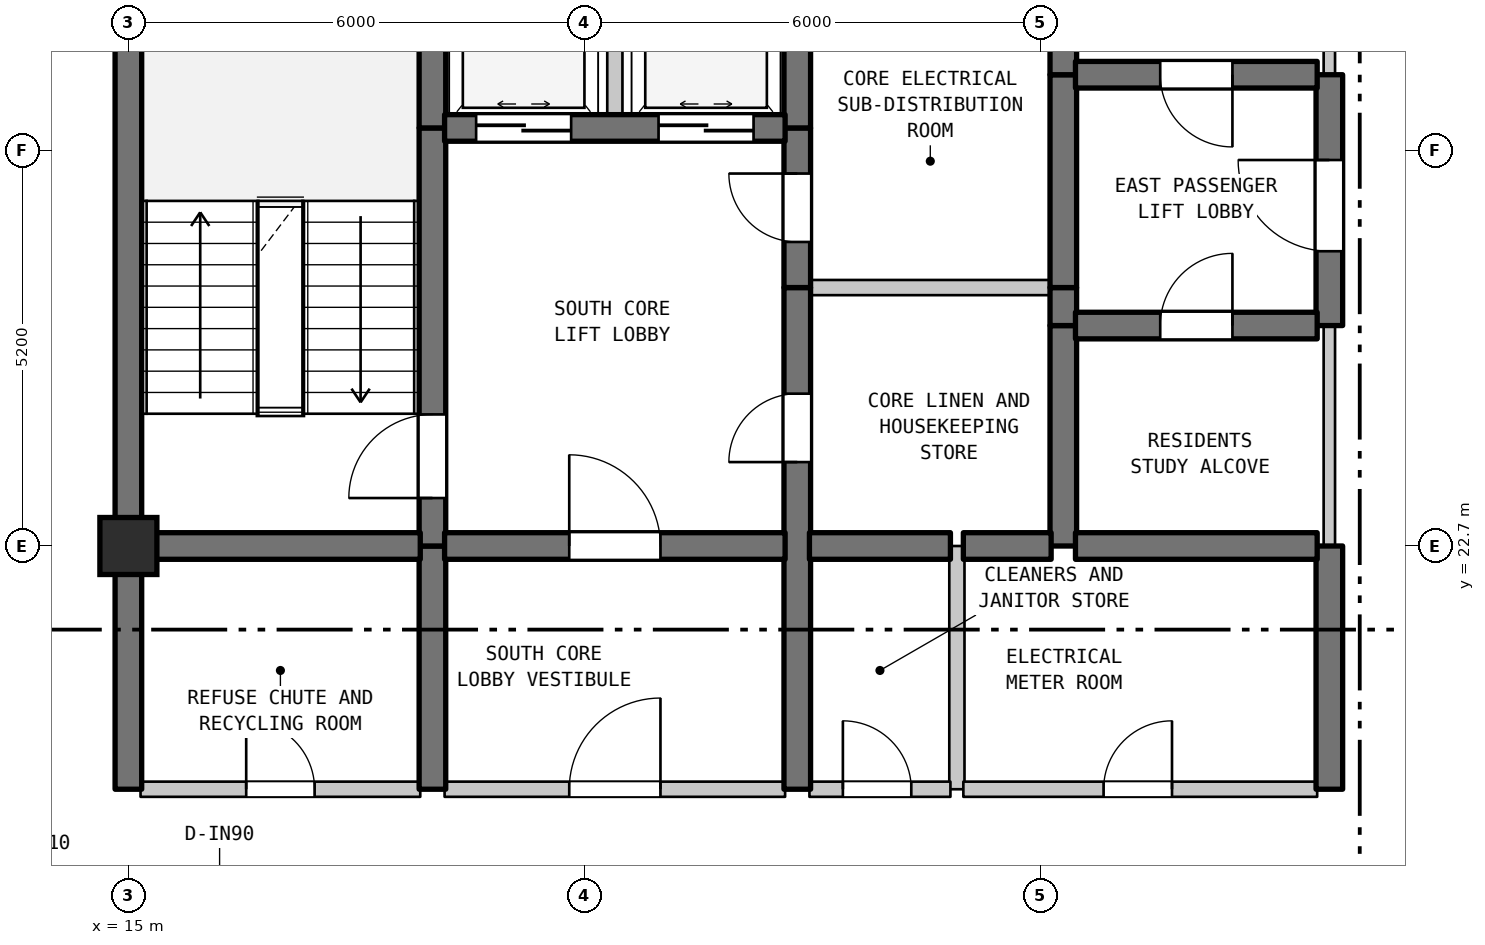
"""IFC4 building model, lengths in metres.
Left out: names, types, materials, properties, quantities, classifications, styles, units other than length and angle.
Written with IfcOpenShell. Run it as: python <this file> out.ifc"""

import sys

from ifc_helpers import new_model, si_unit, direction, frame, frame_2d, origin, origin_2d, place, context, subcontext, project, spatial, rectangle, extrude, element, fill, save


model = new_model("IFC4")
c1 = context("Model", 3, precision=1e-05, world=origin(), true_north=direction((0.0, 1.0)))
c2 = subcontext(c1, "Body", "Model", "MODEL_VIEW")
j1 = project(units=[si_unit("LENGTHUNIT", "METRE"), si_unit("PLANEANGLEUNIT", "RADIAN")], contexts=[c1])
p1 = place(None, origin())
s1 = spatial("IfcSite", under=j1, at=p1, CompositionType="ELEMENT")
p2 = place(p1, origin())
s2 = spatial("IfcBuilding", under=s1, at=p2, CompositionType="ELEMENT")
p3 = place(p2, frame((0.0, 0.0, 269.5)))
s3 = spatial("IfcBuildingStorey", under=s2, at=p3, CompositionType="ELEMENT", Elevation=269.5)
p4 = place(p3, frame((15.0, 22.7, 0.0), z_axis=(0.0, 0.0, 1.0), x_axis=(1.0, 0.0, 0.0)))
e1 = element("IfcColumn", 1, at=p4, inside=s3, PredefinedType="COLUMN", context=c2, shape_type="SweptSolid", body=[
    extrude(rectangle(XDim=0.75, YDim=0.75, at=origin_2d()), origin(), (0.0, 0.0, 1.0), 3.7),
])
p5 = place(p3, frame((15.0, 19.5, 0.0), z_axis=(0.0, 0.0, 1.0), x_axis=(0.0, 1.0, 0.0)))
e2 = element("IfcWall", 2, at=p5, inside=s3, PredefinedType="SHEAR", context=c2, shape_type="SweptSolid", body=[
    extrude(rectangle(XDim=3.2, YDim=0.35, at=frame_2d((1.6, 0.0))), origin(), (0.0, 0.0, 1.0), 3.39),
])
p6 = place(p3, frame((15.0, 22.7, 0.0), z_axis=(0.0, 0.0, 1.0), x_axis=(0.0, 1.0, 0.0)))
e3 = element("IfcWall", 3, at=p6, inside=s3, PredefinedType="SHEAR", context=c2, shape_type="SweptSolid", body=[
    extrude(rectangle(XDim=6.8, YDim=0.35, at=frame_2d((3.4, 0.0))), origin(), (0.0, 0.0, 1.0), 3.39),
])
p7 = place(p3, frame((19.0, 19.5, 0.0), z_axis=(0.0, 0.0, 1.0), x_axis=(0.0, 1.0, 0.0)))
e4 = element("IfcWall", 4, at=p7, inside=s3, PredefinedType="SHEAR", context=c2, shape_type="SweptSolid", body=[
    extrude(rectangle(XDim=3.2, YDim=0.35, at=frame_2d((1.6, 0.0))), origin(), (0.0, 0.0, 1.0), 3.39),
])
p8 = place(p3, frame((19.0, 22.7, 0.0), z_axis=(0.0, 0.0, 1.0), x_axis=(0.0, 1.0, 0.0)))
e5 = element("IfcWall", 5, at=p8, inside=s3, PredefinedType="SHEAR", context=c2, shape_type="SweptSolid", body=[
    extrude(rectangle(XDim=5.5, YDim=0.35, at=frame_2d((2.75, 0.0))), origin(), (0.0, 0.0, 1.0), 3.39),
])
p9 = place(p8, frame((0.631, 0.0, 0.0)))
e6 = element("IfcOpeningElement", 6, at=p9, cuts=e5, PredefinedType="OPENING", context=c2, shape_type="SweptSolid", body=[
    extrude(rectangle(XDim=1.1, YDim=2.15, at=frame_2d((0.55, 1.075))), frame((0.0, 0.185, 0.0), z_axis=(0.0, -1.0, 0.0), x_axis=(1.0, 0.0, 0.0)), (0.0, 0.0, 1.0), 0.37),
])
p10 = place(p3, frame((19.0, 28.2, 0.0), z_axis=(0.0, 0.0, 1.0), x_axis=(0.0, 1.0, 0.0)))
e7 = element("IfcWall", 7, at=p10, inside=s3, PredefinedType="SHEAR", context=c2, shape_type="SweptSolid", body=[
    extrude(rectangle(XDim=1.3, YDim=0.35, at=frame_2d((0.65, 0.0))), origin(), (0.0, 0.0, 1.0), 3.39),
])
p11 = place(p3, frame((21.4, 28.2, 0.0), z_axis=(0.0, 0.0, 1.0), x_axis=(0.0, 1.0, 0.0)))
e8 = element("IfcWall", 8, at=p11, inside=s3, PredefinedType="STANDARD", context=c2, shape_type="SweptSolid", body=[
    extrude(rectangle(XDim=2.6, YDim=0.2, at=frame_2d((1.3, 0.0))), origin(), (0.0, 0.0, 1.0), 3.39),
])
p12 = place(p3, frame((23.8, 19.5, 0.0), z_axis=(0.0, 0.0, 1.0), x_axis=(0.0, 1.0, 0.0)))
e9 = element("IfcWall", 9, at=p12, inside=s3, PredefinedType="SHEAR", context=c2, shape_type="SweptSolid", body=[
    extrude(rectangle(XDim=6.6, YDim=0.35, at=frame_2d((3.3, 0.0))), origin(), (0.0, 0.0, 1.0), 3.39),
])
p13 = place(p12, frame((4.304, 0.0, 0.0)))
e10 = element("IfcOpeningElement", 10, at=p13, cuts=e9, PredefinedType="OPENING", context=c2, shape_type="SweptSolid", body=[
    extrude(rectangle(XDim=0.9, YDim=2.15, at=frame_2d((0.45, 1.075))), frame((0.0, 0.185, 0.0), z_axis=(0.0, -1.0, 0.0), x_axis=(1.0, 0.0, 0.0)), (0.0, 0.0, 1.0), 0.37),
])
p14 = place(p3, frame((23.8, 26.1, 0.0), z_axis=(0.0, 0.0, 1.0), x_axis=(0.0, 1.0, 0.0)))
e11 = element("IfcWall", 11, at=p14, inside=s3, PredefinedType="SHEAR", context=c2, shape_type="SweptSolid", body=[
    extrude(rectangle(XDim=2.1, YDim=0.35, at=frame_2d((1.05, 0.0))), origin(), (0.0, 0.0, 1.0), 3.39),
])
p15 = place(p14, frame((0.6, 0.0, 0.0)))
e12 = element("IfcOpeningElement", 12, at=p15, cuts=e11, PredefinedType="OPENING", context=c2, shape_type="SweptSolid", body=[
    extrude(rectangle(XDim=0.9, YDim=2.15, at=frame_2d((0.45, 1.075))), frame((0.0, 0.185, 0.0), z_axis=(0.0, -1.0, 0.0), x_axis=(1.0, 0.0, 0.0)), (0.0, 0.0, 1.0), 0.37),
])
p16 = place(p3, frame((23.8, 28.2, 0.0), z_axis=(0.0, 0.0, 1.0), x_axis=(0.0, 1.0, 0.0)))
e13 = element("IfcWall", 13, at=p16, inside=s3, PredefinedType="SHEAR", context=c2, shape_type="SweptSolid", body=[
    extrude(rectangle(XDim=2.6, YDim=0.35, at=frame_2d((1.3, 0.0))), origin(), (0.0, 0.0, 1.0), 3.39),
])
p17 = place(p3, frame((25.9, 19.5, 0.0), z_axis=(0.0, 0.0, 1.0), x_axis=(0.0, 1.0, 0.0)))
e14 = element("IfcWall", 14, at=p17, inside=s3, PredefinedType="STANDARD", context=c2, shape_type="SweptSolid", body=[
    extrude(rectangle(XDim=3.2, YDim=0.2, at=frame_2d((1.6, 0.0))), origin(), (0.0, 0.0, 1.0), 3.39),
])
p18 = place(p3, frame((27.3, 22.7, 0.0), z_axis=(0.0, 0.0, 1.0), x_axis=(0.0, 1.0, 0.0)))
e15 = element("IfcWall", 15, at=p18, inside=s3, PredefinedType="SHEAR", context=c2, shape_type="SweptSolid", body=[
    extrude(rectangle(XDim=2.9, YDim=0.35, at=frame_2d((1.45, 0.0))), origin(), (0.0, 0.0, 1.0), 3.39),
])
p19 = place(p3, frame((27.3, 25.6, 0.0), z_axis=(0.0, 0.0, 1.0), x_axis=(0.0, 1.0, 0.0)))
e16 = element("IfcWall", 16, at=p19, inside=s3, PredefinedType="SHEAR", context=c2, shape_type="SweptSolid", body=[
    extrude(rectangle(XDim=0.5, YDim=0.35, at=frame_2d((0.25, 0.0))), origin(), (0.0, 0.0, 1.0), 3.39),
])
p20 = place(p3, frame((27.3, 26.1, 0.0), z_axis=(0.0, 0.0, 1.0), x_axis=(0.0, 1.0, 0.0)))
e17 = element("IfcWall", 17, at=p20, inside=s3, PredefinedType="SHEAR", context=c2, shape_type="SweptSolid", body=[
    extrude(rectangle(XDim=2.8, YDim=0.35, at=frame_2d((1.4, 0.0))), origin(), (0.0, 0.0, 1.0), 3.39),
])
p21 = place(p3, frame((27.3, 28.9, 0.0), z_axis=(0.0, 0.0, 1.0), x_axis=(0.0, 1.0, 0.0)))
e18 = element("IfcWall", 18, at=p21, inside=s3, PredefinedType="SHEAR", context=c2, shape_type="SweptSolid", body=[
    extrude(rectangle(XDim=2.6, YDim=0.35, at=frame_2d((1.3, 0.0))), origin(), (0.0, 0.0, 1.0), 3.39),
])
p22 = place(p3, frame((30.8, 19.5, 0.0), z_axis=(0.0, 0.0, 1.0), x_axis=(0.0, 1.0, 0.0)))
e19 = element("IfcWall", 19, at=p22, inside=s3, PredefinedType="SHEAR", context=c2, shape_type="SweptSolid", body=[
    extrude(rectangle(XDim=3.2, YDim=0.35, at=frame_2d((1.6, 0.0))), origin(), (0.0, 0.0, 1.0), 3.39),
])
p23 = place(p3, frame((30.8, 22.7, 0.0), z_axis=(0.0, 0.0, 1.0), x_axis=(0.0, 1.0, 0.0)))
e20 = element("IfcWall", 20, at=p23, inside=s3, PredefinedType="STANDARD", context=c2, shape_type="SweptSolid", body=[
    extrude(rectangle(XDim=2.9, YDim=0.15, at=frame_2d((1.45, 0.0))), origin(), (0.0, 0.0, 1.0), 3.39),
])
p24 = place(p3, frame((30.8, 25.6, 0.0), z_axis=(0.0, 0.0, 1.0), x_axis=(0.0, 1.0, 0.0)))
e21 = element("IfcWall", 21, at=p24, inside=s3, PredefinedType="SHEAR", context=c2, shape_type="SweptSolid", body=[
    extrude(rectangle(XDim=3.3, YDim=0.35, at=frame_2d((1.65, 0.0))), origin(), (0.0, 0.0, 1.0), 3.39),
])
p25 = place(p24, frame((0.978, 0.0, 0.0)))
e22 = element("IfcOpeningElement", 22, at=p25, cuts=e21, PredefinedType="OPENING", context=c2, shape_type="SweptSolid", body=[
    extrude(rectangle(XDim=1.2, YDim=2.2, at=frame_2d((0.6, 1.1))), frame((0.0, 0.185, 0.0), z_axis=(0.0, -1.0, 0.0), x_axis=(1.0, 0.0, 0.0)), (0.0, 0.0, 1.0), 0.37),
])
p26 = place(p3, frame((30.8, 28.9, 0.0), z_axis=(0.0, 0.0, 1.0), x_axis=(0.0, 1.0, 0.0)))
e23 = element("IfcWall", 23, at=p26, inside=s3, PredefinedType="STANDARD", context=c2, shape_type="SweptSolid", body=[
    extrude(rectangle(XDim=2.6, YDim=0.15, at=frame_2d((1.3, 0.0))), origin(), (0.0, 0.0, 1.0), 3.39),
])
p27 = place(p3, frame((15.16, 19.5, 0.0), z_axis=(0.0, 0.0, 1.0), x_axis=(1.0, 0.0, 0.0)))
e24 = element("IfcWall", 24, at=p27, inside=s3, PredefinedType="STANDARD", context=c2, shape_type="SweptSolid", body=[
    extrude(rectangle(XDim=3.68, YDim=0.2, at=frame_2d((1.84, 0.0))), origin(), (0.0, 0.0, 1.0), 3.39),
])
p28 = place(p27, frame((1.39, 0.0, 0.0)))
e25 = element("IfcOpeningElement", 25, at=p28, cuts=e24, PredefinedType="OPENING", context=c2, shape_type="SweptSolid", body=[
    extrude(rectangle(XDim=0.9, YDim=2.15, at=frame_2d((0.45, 1.075))), frame((0.0, 0.11, 0.0), z_axis=(0.0, -1.0, 0.0), x_axis=(1.0, 0.0, 0.0)), (0.0, 0.0, 1.0), 0.22),
])
p29 = place(p3, frame((19.16, 19.5, 0.0), z_axis=(0.0, 0.0, 1.0), x_axis=(1.0, 0.0, 0.0)))
e26 = element("IfcWall", 26, at=p29, inside=s3, PredefinedType="STANDARD", context=c2, shape_type="SweptSolid", body=[
    extrude(rectangle(XDim=4.48, YDim=0.2, at=frame_2d((2.24, 0.0))), origin(), (0.0, 0.0, 1.0), 3.39),
])
p30 = place(p29, frame((1.64, 0.0, 0.0)))
e27 = element("IfcOpeningElement", 27, at=p30, cuts=e26, PredefinedType="OPENING", context=c2, shape_type="SweptSolid", body=[
    extrude(rectangle(XDim=1.2, YDim=2.2, at=frame_2d((0.6, 1.1))), frame((0.0, 0.11, 0.0), z_axis=(0.0, -1.0, 0.0), x_axis=(1.0, 0.0, 0.0)), (0.0, 0.0, 1.0), 0.22),
])
p31 = place(p3, frame((23.96, 19.5, 0.0), z_axis=(0.0, 0.0, 1.0), x_axis=(1.0, 0.0, 0.0)))
e28 = element("IfcWall", 28, at=p31, inside=s3, PredefinedType="STANDARD", context=c2, shape_type="SweptSolid", body=[
    extrude(rectangle(XDim=1.855, YDim=0.2, at=frame_2d((0.927, 0.0))), origin(), (0.0, 0.0, 1.0), 3.39),
])
p32 = place(p31, frame((0.44, 0.0, 0.0)))
e29 = element("IfcOpeningElement", 29, at=p32, cuts=e28, PredefinedType="OPENING", context=c2, shape_type="SweptSolid", body=[
    extrude(rectangle(XDim=0.9, YDim=2.15, at=frame_2d((0.45, 1.075))), frame((0.0, 0.11, 0.0), z_axis=(0.0, -1.0, 0.0), x_axis=(1.0, 0.0, 0.0)), (0.0, 0.0, 1.0), 0.22),
])
p33 = place(p3, frame((25.985, 19.5, 0.0), z_axis=(0.0, 0.0, 1.0), x_axis=(1.0, 0.0, 0.0)))
e30 = element("IfcWall", 30, at=p33, inside=s3, PredefinedType="STANDARD", context=c2, shape_type="SweptSolid", body=[
    extrude(rectangle(XDim=4.655, YDim=0.2, at=frame_2d((2.327, 0.0))), origin(), (0.0, 0.0, 1.0), 3.39),
])
p34 = place(p33, frame((1.845, 0.0, 0.0)))
e31 = element("IfcOpeningElement", 31, at=p34, cuts=e30, PredefinedType="OPENING", context=c2, shape_type="SweptSolid", body=[
    extrude(rectangle(XDim=0.9, YDim=2.15, at=frame_2d((0.45, 1.075))), frame((0.0, 0.11, 0.0), z_axis=(0.0, -1.0, 0.0), x_axis=(1.0, 0.0, 0.0)), (0.0, 0.0, 1.0), 0.22),
])
p35 = place(p3, frame((15.16, 22.7, 0.0), z_axis=(0.0, 0.0, 1.0), x_axis=(1.0, 0.0, 0.0)))
e32 = element("IfcWall", 32, at=p35, inside=s3, PredefinedType="SHEAR", context=c2, shape_type="SweptSolid", body=[
    extrude(rectangle(XDim=3.68, YDim=0.35, at=frame_2d((1.84, 0.0))), origin(), (0.0, 0.0, 1.0), 3.39),
])
p36 = place(p3, frame((19.16, 22.7, 0.0), z_axis=(0.0, 0.0, 1.0), x_axis=(1.0, 0.0, 0.0)))
e33 = element("IfcWall", 33, at=p36, inside=s3, PredefinedType="SHEAR", context=c2, shape_type="SweptSolid", body=[
    extrude(rectangle(XDim=4.48, YDim=0.35, at=frame_2d((2.24, 0.0))), origin(), (0.0, 0.0, 1.0), 3.39),
])
p37 = place(p36, frame((1.64, 0.0, 0.0)))
e34 = element("IfcOpeningElement", 34, at=p37, cuts=e33, PredefinedType="OPENING", context=c2, shape_type="SweptSolid", body=[
    extrude(rectangle(XDim=1.2, YDim=2.2, at=frame_2d((0.6, 1.1))), frame((0.0, 0.185, 0.0), z_axis=(0.0, -1.0, 0.0), x_axis=(1.0, 0.0, 0.0)), (0.0, 0.0, 1.0), 0.37),
])
p38 = place(p3, frame((23.96, 22.7, 0.0), z_axis=(0.0, 0.0, 1.0), x_axis=(1.0, 0.0, 0.0)))
e35 = element("IfcWall", 35, at=p38, inside=s3, PredefinedType="SHEAR", context=c2, shape_type="SweptSolid", body=[
    extrude(rectangle(XDim=1.855, YDim=0.35, at=frame_2d((0.927, 0.0))), origin(), (0.0, 0.0, 1.0), 3.39),
])
p39 = place(p3, frame((25.985, 22.7, 0.0), z_axis=(0.0, 0.0, 1.0), x_axis=(1.0, 0.0, 0.0)))
e36 = element("IfcWall", 36, at=p39, inside=s3, PredefinedType="SHEAR", context=c2, shape_type="SweptSolid", body=[
    extrude(rectangle(XDim=1.155, YDim=0.35, at=frame_2d((0.577, 0.0))), origin(), (0.0, 0.0, 1.0), 3.39),
])
p40 = place(p3, frame((27.46, 22.7, 0.0), z_axis=(0.0, 0.0, 1.0), x_axis=(1.0, 0.0, 0.0)))
e37 = element("IfcWall", 37, at=p40, inside=s3, PredefinedType="SHEAR", context=c2, shape_type="SweptSolid", body=[
    extrude(rectangle(XDim=3.18, YDim=0.35, at=frame_2d((1.59, 0.0))), origin(), (0.0, 0.0, 1.0), 3.39),
])
p41 = place(p3, frame((27.46, 25.6, 0.0), z_axis=(0.0, 0.0, 1.0), x_axis=(1.0, 0.0, 0.0)))
e38 = element("IfcWall", 38, at=p41, inside=s3, PredefinedType="SHEAR", context=c2, shape_type="SweptSolid", body=[
    extrude(rectangle(XDim=3.18, YDim=0.35, at=frame_2d((1.59, 0.0))), origin(), (0.0, 0.0, 1.0), 3.39),
])
p42 = place(p41, frame((1.115, 0.0, 0.0)))
e39 = element("IfcOpeningElement", 39, at=p42, cuts=e38, PredefinedType="OPENING", context=c2, shape_type="SweptSolid", body=[
    extrude(rectangle(XDim=0.95, YDim=2.15, at=frame_2d((0.475, 1.075))), frame((0.0, 0.185, 0.0), z_axis=(0.0, -1.0, 0.0), x_axis=(1.0, 0.0, 0.0)), (0.0, 0.0, 1.0), 0.37),
])
p43 = place(p3, frame((23.96, 26.1, 0.0), z_axis=(0.0, 0.0, 1.0), x_axis=(1.0, 0.0, 0.0)))
e40 = element("IfcWall", 40, at=p43, inside=s3, PredefinedType="STANDARD", context=c2, shape_type="SweptSolid", body=[
    extrude(rectangle(XDim=3.18, YDim=0.2, at=frame_2d((1.59, 0.0))), origin(), (0.0, 0.0, 1.0), 3.39),
])
p44 = place(p3, frame((19.16, 28.2, 0.0), z_axis=(0.0, 0.0, 1.0), x_axis=(1.0, 0.0, 0.0)))
e41 = element("IfcWall", 41, at=p44, inside=s3, PredefinedType="SHEAR", context=c2, shape_type="SweptSolid", body=[
    extrude(rectangle(XDim=4.48, YDim=0.35, at=frame_2d((2.24, 0.0))), origin(), (0.0, 0.0, 1.0), 3.39),
])
p45 = place(p44, frame((0.415, 0.0, 0.0)))
e42 = element("IfcOpeningElement", 42, at=p45, cuts=e41, PredefinedType="OPENING", context=c2, shape_type="SweptSolid", body=[
    extrude(rectangle(XDim=1.25, YDim=2.2, at=frame_2d((0.625, 1.1))), frame((0.0, 0.185, 0.0), z_axis=(0.0, -1.0, 0.0), x_axis=(1.0, 0.0, 0.0)), (0.0, 0.0, 1.0), 0.37),
])
p46 = place(p44, frame((2.815, 0.0, 0.0)))
e43 = element("IfcOpeningElement", 43, at=p46, cuts=e41, PredefinedType="OPENING", context=c2, shape_type="SweptSolid", body=[
    extrude(rectangle(XDim=1.25, YDim=2.2, at=frame_2d((0.625, 1.1))), frame((0.0, 0.185, 0.0), z_axis=(0.0, -1.0, 0.0), x_axis=(1.0, 0.0, 0.0)), (0.0, 0.0, 1.0), 0.37),
])
p47 = place(p3, frame((27.46, 28.9, 0.0), z_axis=(0.0, 0.0, 1.0), x_axis=(1.0, 0.0, 0.0)))
e44 = element("IfcWall", 44, at=p47, inside=s3, PredefinedType="SHEAR", context=c2, shape_type="SweptSolid", body=[
    extrude(rectangle(XDim=3.18, YDim=0.35, at=frame_2d((1.59, 0.0))), origin(), (0.0, 0.0, 1.0), 3.39),
])
p48 = place(p47, frame((1.115, 0.0, 0.0)))
e45 = element("IfcOpeningElement", 45, at=p48, cuts=e44, PredefinedType="OPENING", context=c2, shape_type="SweptSolid", body=[
    extrude(rectangle(XDim=0.95, YDim=2.15, at=frame_2d((0.475, 1.075))), frame((0.0, 0.185, 0.0), z_axis=(0.0, -1.0, 0.0), x_axis=(1.0, 0.0, 0.0)), (0.0, 0.0, 1.0), 0.37),
])
p49 = place(p9, origin())
e46 = element("IfcDoor", 46, at=p49, inside=s3, OperationType="SINGLE_SWING_LEFT", PredefinedType="DOOR", context=c2, shape_type="SweptSolid", body=[
    extrude(rectangle(XDim=1.1, YDim=2.15, at=frame_2d((0.55, 1.075))), frame((0.0, 0.025, 0.0), z_axis=(0.0, -1.0, 0.0), x_axis=(1.0, 0.0, 0.0)), (0.0, 0.0, 1.0), 0.05),
])
fill(e6, e46)
p50 = place(p13, origin())
e47 = element("IfcDoor", 47, at=p50, inside=s3, OperationType="SINGLE_SWING_LEFT", PredefinedType="DOOR", context=c2, shape_type="SweptSolid", body=[
    extrude(rectangle(XDim=0.9, YDim=2.15, at=frame_2d((0.45, 1.075))), frame((0.0, 0.025, 0.0), z_axis=(0.0, -1.0, 0.0), x_axis=(1.0, 0.0, 0.0)), (0.0, 0.0, 1.0), 0.05),
])
fill(e10, e47)
p51 = place(p15, origin())
e48 = element("IfcDoor", 48, at=p51, inside=s3, OperationType="SINGLE_SWING_RIGHT", PredefinedType="DOOR", context=c2, shape_type="SweptSolid", body=[
    extrude(rectangle(XDim=0.9, YDim=2.15, at=frame_2d((0.45, 1.075))), frame((0.0, 0.025, 0.0), z_axis=(0.0, -1.0, 0.0), x_axis=(1.0, 0.0, 0.0)), (0.0, 0.0, 1.0), 0.05),
])
fill(e12, e48)
p52 = place(p25, origin())
e49 = element("IfcDoor", 49, at=p52, inside=s3, OperationType="SINGLE_SWING_RIGHT", PredefinedType="DOOR", context=c2, shape_type="SweptSolid", body=[
    extrude(rectangle(XDim=1.2, YDim=2.2, at=frame_2d((0.6, 1.1))), frame((0.0, 0.025, 0.0), z_axis=(0.0, -1.0, 0.0), x_axis=(1.0, 0.0, 0.0)), (0.0, 0.0, 1.0), 0.05),
])
fill(e22, e49)
p53 = place(p28, origin())
e50 = element("IfcDoor", 50, at=p53, inside=s3, OperationType="SINGLE_SWING_LEFT", PredefinedType="DOOR", context=c2, shape_type="SweptSolid", body=[
    extrude(rectangle(XDim=0.9, YDim=2.15, at=frame_2d((0.45, 1.075))), frame((0.0, 0.025, 0.0), z_axis=(0.0, -1.0, 0.0), x_axis=(1.0, 0.0, 0.0)), (0.0, 0.0, 1.0), 0.05),
])
fill(e25, e50)
p54 = place(p30, origin())
e51 = element("IfcDoor", 51, at=p54, inside=s3, OperationType="SINGLE_SWING_RIGHT", PredefinedType="DOOR", context=c2, shape_type="SweptSolid", body=[
    extrude(rectangle(XDim=1.2, YDim=2.2, at=frame_2d((0.6, 1.1))), frame((0.0, 0.025, 0.0), z_axis=(0.0, -1.0, 0.0), x_axis=(1.0, 0.0, 0.0)), (0.0, 0.0, 1.0), 0.05),
])
fill(e27, e51)
p55 = place(p32, origin())
e52 = element("IfcDoor", 52, at=p55, inside=s3, OperationType="SINGLE_SWING_LEFT", PredefinedType="DOOR", context=c2, shape_type="SweptSolid", body=[
    extrude(rectangle(XDim=0.9, YDim=2.15, at=frame_2d((0.45, 1.075))), frame((0.0, 0.025, 0.0), z_axis=(0.0, -1.0, 0.0), x_axis=(1.0, 0.0, 0.0)), (0.0, 0.0, 1.0), 0.05),
])
fill(e29, e52)
p56 = place(p34, origin())
e53 = element("IfcDoor", 53, at=p56, inside=s3, OperationType="SINGLE_SWING_RIGHT", PredefinedType="DOOR", context=c2, shape_type="SweptSolid", body=[
    extrude(rectangle(XDim=0.9, YDim=2.15, at=frame_2d((0.45, 1.075))), frame((0.0, 0.025, 0.0), z_axis=(0.0, -1.0, 0.0), x_axis=(1.0, 0.0, 0.0)), (0.0, 0.0, 1.0), 0.05),
])
fill(e31, e53)
p57 = place(p37, origin())
e54 = element("IfcDoor", 54, at=p57, inside=s3, OperationType="SINGLE_SWING_LEFT", PredefinedType="DOOR", context=c2, shape_type="SweptSolid", body=[
    extrude(rectangle(XDim=1.2, YDim=2.2, at=frame_2d((0.6, 1.1))), frame((0.0, 0.025, 0.0), z_axis=(0.0, -1.0, 0.0), x_axis=(1.0, 0.0, 0.0)), (0.0, 0.0, 1.0), 0.05),
])
fill(e34, e54)
p58 = place(p42, origin())
e55 = element("IfcDoor", 55, at=p58, inside=s3, OperationType="SINGLE_SWING_RIGHT", PredefinedType="DOOR", context=c2, shape_type="SweptSolid", body=[
    extrude(rectangle(XDim=0.95, YDim=2.15, at=frame_2d((0.475, 1.075))), frame((0.0, 0.025, 0.0), z_axis=(0.0, -1.0, 0.0), x_axis=(1.0, 0.0, 0.0)), (0.0, 0.0, 1.0), 0.05),
])
fill(e39, e55)
p59 = place(p45, origin())
e56 = element("IfcDoor", 56, at=p59, inside=s3, OperationType="DOUBLE_DOOR_SLIDING", PredefinedType="DOOR", context=c2, shape_type="SweptSolid", body=[
    extrude(rectangle(XDim=1.25, YDim=2.2, at=frame_2d((0.625, 1.1))), frame((0.0, 0.025, 0.0), z_axis=(0.0, -1.0, 0.0), x_axis=(1.0, 0.0, 0.0)), (0.0, 0.0, 1.0), 0.05),
])
fill(e42, e56)
p60 = place(p46, origin())
e57 = element("IfcDoor", 57, at=p60, inside=s3, OperationType="DOUBLE_DOOR_SLIDING", PredefinedType="DOOR", context=c2, shape_type="SweptSolid", body=[
    extrude(rectangle(XDim=1.25, YDim=2.2, at=frame_2d((0.625, 1.1))), frame((0.0, 0.025, 0.0), z_axis=(0.0, -1.0, 0.0), x_axis=(1.0, 0.0, 0.0)), (0.0, 0.0, 1.0), 0.05),
])
fill(e43, e57)
p61 = place(p48, frame((0.95, 0.0, 0.0), z_axis=(0.0, 0.0, 1.0), x_axis=(-1.0, 0.0, 0.0)))
e58 = element("IfcDoor", 58, at=p61, inside=s3, OperationType="SINGLE_SWING_RIGHT", PredefinedType="DOOR", context=c2, shape_type="SweptSolid", body=[
    extrude(rectangle(XDim=0.95, YDim=2.15, at=frame_2d((0.475, 1.075))), frame((0.0, 0.025, 0.0), z_axis=(0.0, -1.0, 0.0), x_axis=(1.0, 0.0, 0.0)), (0.0, 0.0, 1.0), 0.05),
])
fill(e45, e58)
save(model, sys.argv[1])
